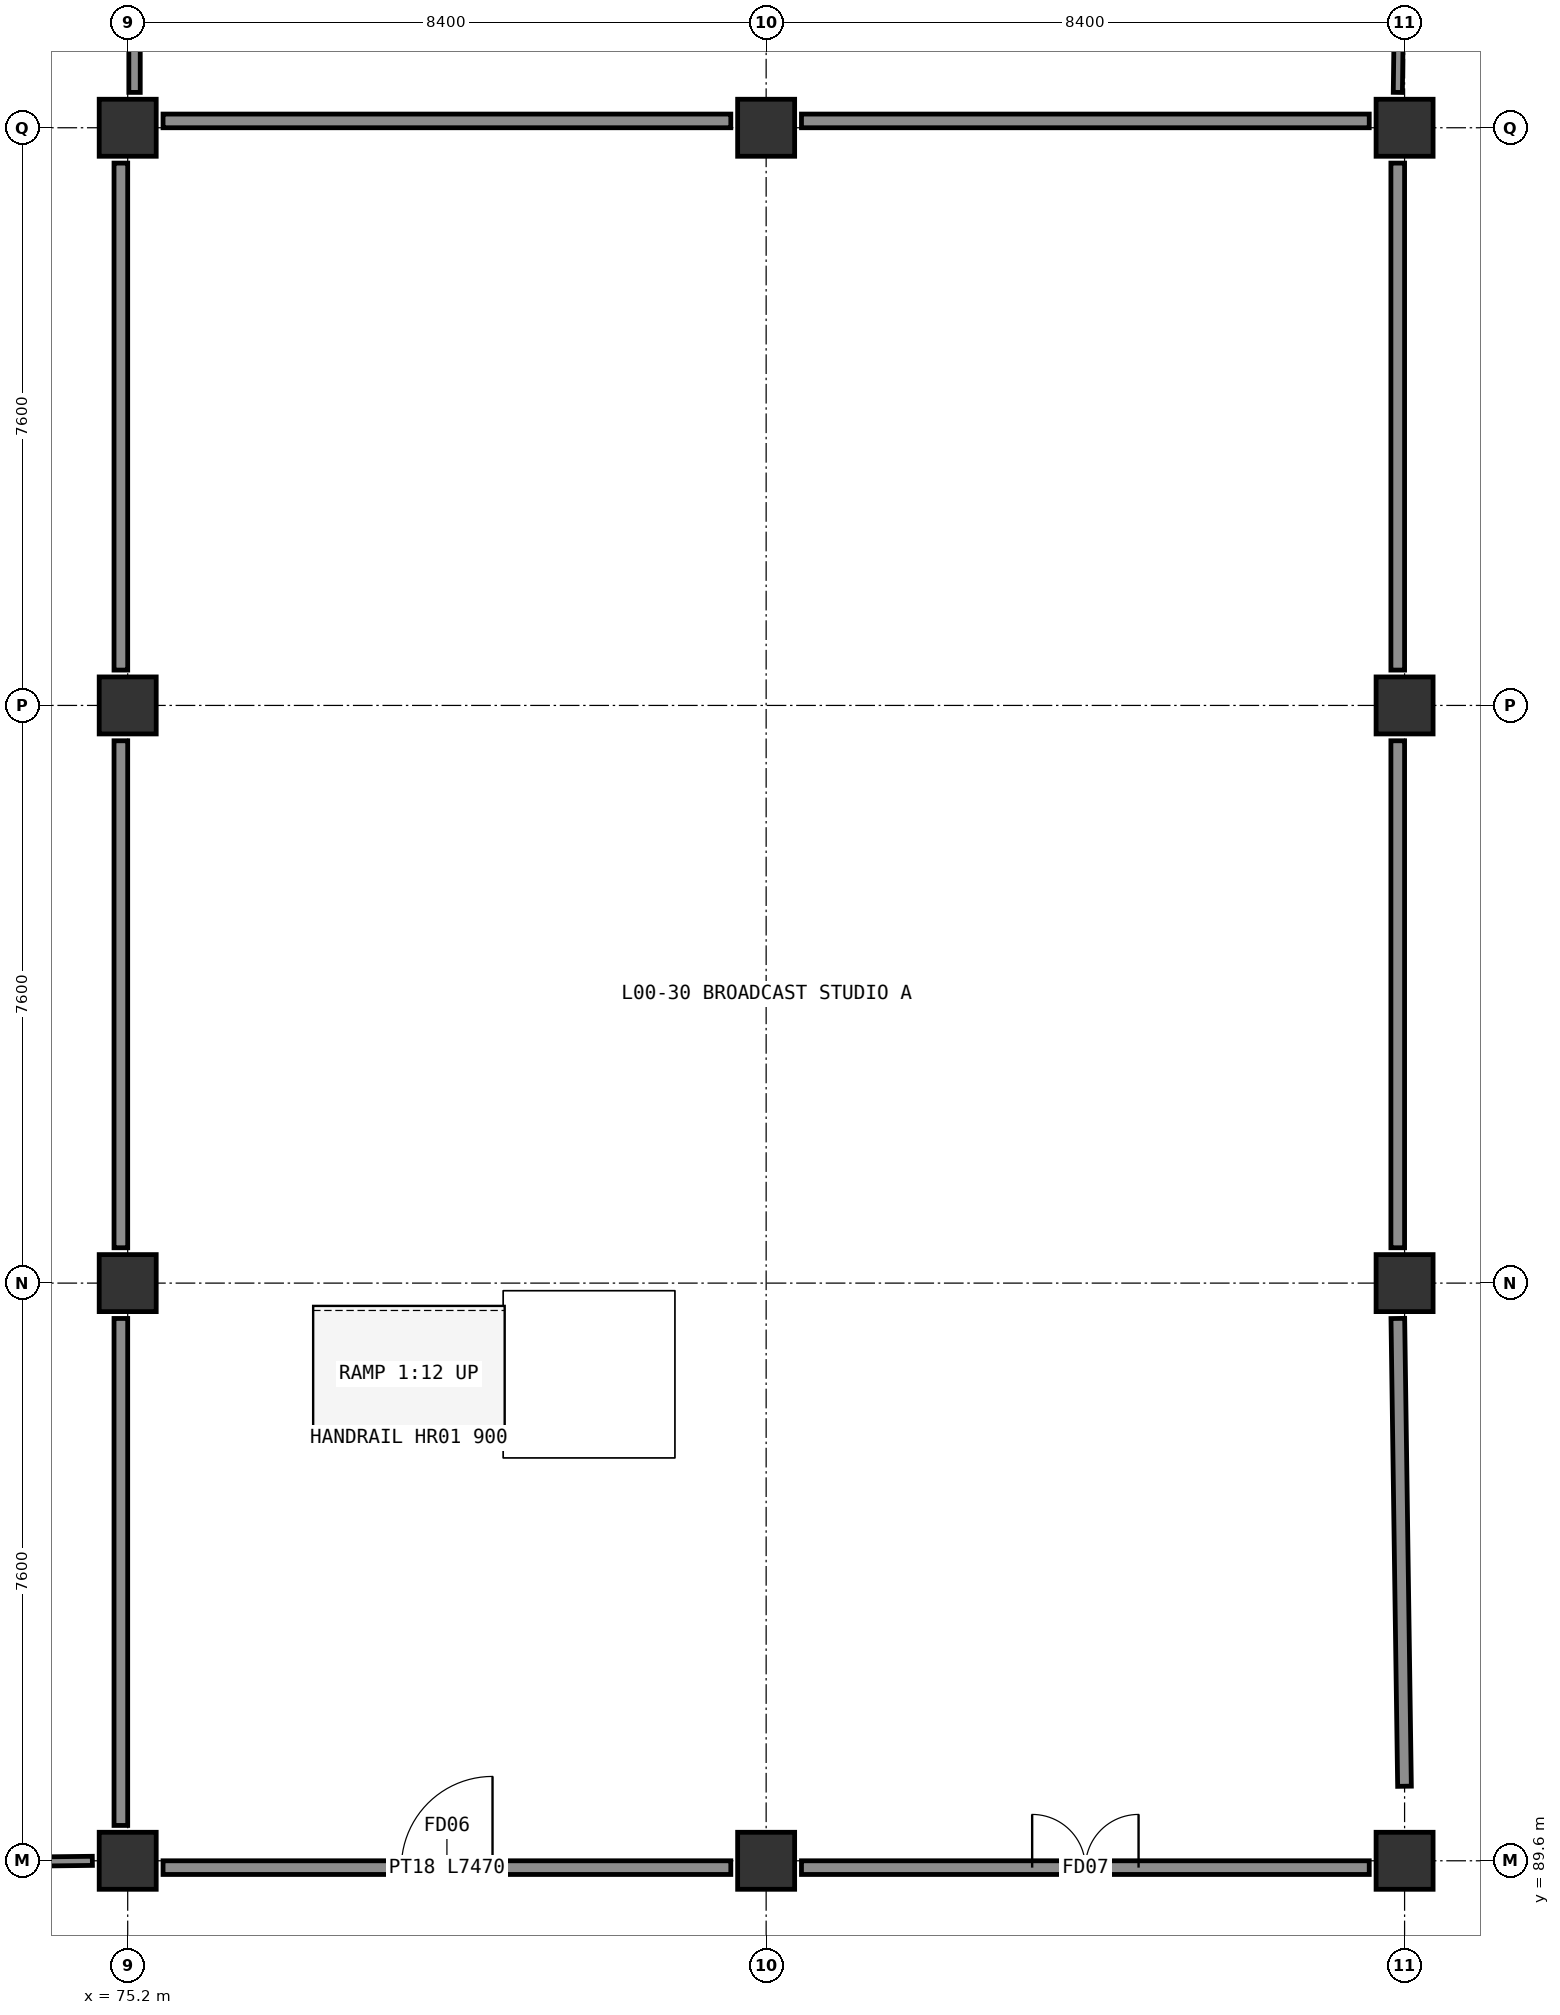
"""IFC4 building model, lengths in metres.
Left out: names, types, materials, properties, quantities, classifications, styles, units other than length and angle.
Written with IfcOpenShell. Run it as: python <this file> out.ifc"""

import sys

from ifc_helpers import new_model, si_unit, direction, frame, frame_2d, origin, origin_2d, place, context, subcontext, project, spatial, rectangle, extrude, element, fill, save


model = new_model("IFC4")
c1 = context("Model", 3, precision=1e-05, world=origin(), true_north=direction((0.0, 1.0)))
c2 = subcontext(c1, "Body", "Model", "MODEL_VIEW")
j1 = project(units=[si_unit("LENGTHUNIT", "METRE"), si_unit("PLANEANGLEUNIT", "RADIAN")], contexts=[c1])
p1 = place(None, origin())
s1 = spatial("IfcSite", under=j1, at=p1, CompositionType="ELEMENT")
p2 = place(p1, origin())
s2 = spatial("IfcBuilding", under=s1, at=p2, CompositionType="ELEMENT")
p3 = place(p2, origin())
s3 = spatial("IfcBuildingStorey", under=s2, at=p3, CompositionType="ELEMENT", Elevation=0.0)
for number, where, z_axis, x_axis in (
    (1, (75.2, 89.6, 0.0), (0.0, 0.0, 1.0), (1.0, 0.0, 0.0)),
    (2, (83.6, 89.6, 0.0), (0.0, 0.0, 1.0), (1.0, 0.0, 0.0)),
    (3, (92.0, 89.6, 0.0), (0.0, 0.0, 1.0), (1.0, 0.0, 0.0)),
    (4, (75.2, 97.2, 0.0), (0.0, 0.0, 1.0), (1.0, 0.0, 0.0)),
    (5, (92.0, 97.2, 0.0), (0.0, 0.0, 1.0), (1.0, 0.0, 0.0)),
    (6, (75.2, 104.8, 0.0), (0.0, 0.0, 1.0), (1.0, 0.0, 0.0)),
    (7, (92.0, 104.8, 0.0), (0.0, 0.0, 1.0), (1.0, 0.0, 0.0)),
    (8, (75.2, 112.4, 0.0), (0.0, 0.0, 1.0), (1.0, 0.0, 0.0)),
    (9, (83.6, 112.4, 0.0), (0.0, 0.0, 1.0), (1.0, 0.0, 0.0)),
    (10, (92.0, 112.4, 0.0), (0.0, 0.0, 1.0), (1.0, 0.0, 0.0)),
):
    element("IfcColumn", number, at=place(p3, frame(where, z_axis=z_axis, x_axis=x_axis)), inside=s3, PredefinedType="COLUMN", context=c2, shape_type="SweptSolid", body=[
        extrude(rectangle(XDim=0.75, YDim=0.75, at=origin_2d()), origin(), (0.0, 0.0, 1.0), 4.8),
    ])
p4 = place(p3, frame((67.28, 89.511, 0.0), z_axis=(0.0, 0.0, 1.0), x_axis=(0.999930126163, 0.01182128555, 0.0)))
e11 = element("IfcWall", 11, at=p4, inside=s3, PredefinedType="PARTITIONING", context=c2, shape_type="SweptSolid", body=[
    extrude(rectangle(XDim=7.456, YDim=0.12, at=frame_2d((3.728, 0.0))), origin(), (0.0, 0.0, 1.0), 3.95),
])
p5 = place(p4, frame((3.103, 0.0, 0.0)))
e12 = element("IfcOpeningElement", 12, at=p5, cuts=e11, PredefinedType="OPENING", context=c2, shape_type="SweptSolid", body=[
    extrude(rectangle(XDim=1.25, YDim=2.12, at=frame_2d((0.625, 1.06))), frame((0.0, 0.07, 0.0), z_axis=(0.0, -1.0, 0.0), x_axis=(1.0, 0.0, 0.0)), (0.0, 0.0, 1.0), 0.14),
])
p6 = place(p3, frame((75.665, 89.51, 0.0), z_axis=(0.0, 0.0, 1.0), x_axis=(1.0, 0.0, 0.0)))
e13 = element("IfcWall", 13, at=p6, inside=s3, PredefinedType="PARTITIONING", context=c2, shape_type="SweptSolid", body=[
    extrude(rectangle(XDim=7.47, YDim=0.18, at=frame_2d((3.735, 0.0))), origin(), (0.0, 0.0, 1.0), 4.187),
])
p7 = place(p6, frame((3.135, 0.0, 0.0)))
e14 = element("IfcOpeningElement", 14, at=p7, cuts=e13, PredefinedType="OPENING", context=c2, shape_type="SweptSolid", body=[
    extrude(rectangle(XDim=1.2, YDim=2.1, at=frame_2d((0.6, 1.05))), frame((0.0, 0.1, 0.0), z_axis=(0.0, -1.0, 0.0), x_axis=(1.0, 0.0, 0.0)), (0.0, 0.0, 1.0), 0.2),
])
p8 = place(p3, frame((84.065, 89.51, 0.0), z_axis=(0.0, 0.0, 1.0), x_axis=(1.0, 0.0, 0.0)))
e15 = element("IfcWall", 15, at=p8, inside=s3, PredefinedType="PARTITIONING", context=c2, shape_type="SweptSolid", body=[
    extrude(rectangle(XDim=7.47, YDim=0.18, at=frame_2d((3.735, 0.0))), origin(), (0.0, 0.0, 1.0), 4.187),
])
p9 = place(p8, frame((3.035, 0.0, 0.0)))
e16 = element("IfcOpeningElement", 16, at=p9, cuts=e15, PredefinedType="OPENING", context=c2, shape_type="SweptSolid", body=[
    extrude(rectangle(XDim=1.4, YDim=2.15, at=frame_2d((0.7, 1.075))), frame((0.0, 0.1, 0.0), z_axis=(0.0, -1.0, 0.0), x_axis=(1.0, 0.0, 0.0)), (0.0, 0.0, 1.0), 0.2),
])
p10 = place(p3, frame((75.29, 112.865, 0.0), z_axis=(0.0, 0.0, 1.0), x_axis=(0.0, 1.0, 0.0)))
e17 = element("IfcWall", 17, at=p10, inside=s3, PredefinedType="PARTITIONING", context=c2, shape_type="SweptSolid", body=[
    extrude(rectangle(XDim=6.655, YDim=0.15, at=frame_2d((3.328, 0.0))), origin(), (0.0, 0.0, 1.0), 3.95),
])
p11 = place(p10, frame((2.887, 0.0, 0.0)))
e18 = element("IfcOpeningElement", 18, at=p11, cuts=e17, PredefinedType="OPENING", context=c2, shape_type="SweptSolid", body=[
    extrude(rectangle(XDim=0.88, YDim=2.08, at=frame_2d((0.44, 1.04))), frame((0.0, 0.085, 0.0), z_axis=(0.0, -1.0, 0.0), x_axis=(1.0, 0.0, 0.0)), (0.0, 0.0, 1.0), 0.17),
])
for number, where, z_axis, x_axis in (
    (19, (83.135, 112.49, 0.0), (0.0, 0.0, 1.0), (-1.0, 0.0, 0.0)),
    (20, (91.535, 112.49, 0.0), (0.0, 0.0, 1.0), (-1.0, 0.0, 0.0)),
):
    element("IfcWall", number, at=place(p3, frame(where, z_axis=z_axis, x_axis=x_axis)), inside=s3, PredefinedType="PARTITIONING", context=c2, shape_type="SweptSolid", body=[
        extrude(rectangle(XDim=7.47, YDim=0.18, at=frame_2d((3.735, 0.0))), origin(), (0.0, 0.0, 1.0), 4.187),
    ])
p12 = place(p3, frame((91.999, 119.52, 0.0), z_axis=(0.0, 0.0, 1.0), x_axis=(-0.013168820212, -0.999913287328, 0.0)))
e21 = element("IfcWall", 21, at=p12, inside=s3, PredefinedType="PARTITIONING", context=c2, shape_type="SweptSolid", body=[
    extrude(rectangle(XDim=6.656, YDim=0.12, at=frame_2d((3.328, 0.0))), origin(), (0.0, 0.0, 1.0), 3.95),
])
p13 = place(p12, frame((2.868, 0.0, 0.0)))
e22 = element("IfcOpeningElement", 22, at=p13, cuts=e21, PredefinedType="OPENING", context=c2, shape_type="SweptSolid", body=[
    extrude(rectangle(XDim=0.92, YDim=2.08, at=frame_2d((0.46, 1.04))), frame((0.0, 0.07, 0.0), z_axis=(0.0, -1.0, 0.0), x_axis=(1.0, 0.0, 0.0)), (0.0, 0.0, 1.0), 0.14),
])
p14 = place(p3, frame((75.11, 104.335, 0.0), z_axis=(0.0, 0.0, 1.0), x_axis=(0.0, -1.0, 0.0)))
e23 = element("IfcWall", 23, at=p14, inside=s3, PredefinedType="PARTITIONING", context=c2, shape_type="SweptSolid", body=[
    extrude(rectangle(XDim=6.67, YDim=0.18, at=frame_2d((3.335, 0.0))), origin(), (0.0, 0.0, 1.0), 3.95),
])
for number, where, z_axis, x_axis in (
    (24, (75.11, 111.935, 0.0), (0.0, 0.0, 1.0), (0.0, -1.0, 0.0)),
    (25, (75.11, 96.735, 0.0), (0.0, 0.0, 1.0), (0.0, -1.0, 0.0)),
):
    element("IfcWall", number, at=place(p3, frame(where, z_axis=z_axis, x_axis=x_axis)), inside=s3, PredefinedType="PARTITIONING", context=c2, shape_type="SweptSolid", body=[
        extrude(rectangle(XDim=6.67, YDim=0.18, at=frame_2d((3.335, 0.0))), origin(), (0.0, 0.0, 1.0), 3.95),
    ])
p15 = place(p3, frame((91.91, 104.335, 0.0), z_axis=(0.0, 0.0, 1.0), x_axis=(0.0, -1.0, 0.0)))
e26 = element("IfcWall", 26, at=p15, inside=s3, PredefinedType="PARTITIONING", context=c2, shape_type="SweptSolid", body=[
    extrude(rectangle(XDim=6.67, YDim=0.18, at=frame_2d((3.335, 0.0))), origin(), (0.0, 0.0, 1.0), 3.95),
])
p16 = place(p3, frame((91.91, 111.935, 0.0), z_axis=(0.0, 0.0, 1.0), x_axis=(0.0, -1.0, 0.0)))
e27 = element("IfcWall", 27, at=p16, inside=s3, PredefinedType="PARTITIONING", context=c2, shape_type="SweptSolid", body=[
    extrude(rectangle(XDim=6.67, YDim=0.18, at=frame_2d((3.335, 0.0))), origin(), (0.0, 0.0, 1.0), 3.95),
])
p17 = place(p3, frame((91.911, 96.735, 0.0), z_axis=(0.0, 0.0, 1.0), x_axis=(0.014239501849, -0.999898613154, 0.0)))
e28 = element("IfcWall", 28, at=p17, inside=s3, PredefinedType="PARTITIONING", context=c2, shape_type="SweptSolid", body=[
    extrude(rectangle(XDim=6.155, YDim=0.18, at=frame_2d((3.078, 0.0))), origin(), (0.0, 0.0, 1.0), 3.95),
])
p18 = place(p7, origin())
e29 = element("IfcDoor", 29, at=p18, inside=s3, OperationType="SINGLE_SWING_RIGHT", PredefinedType="DOOR", context=c2, shape_type="SweptSolid", body=[
    extrude(rectangle(XDim=1.2, YDim=2.1, at=frame_2d((0.6, 1.05))), frame((0.0, 0.025, 0.0), z_axis=(0.0, -1.0, 0.0), x_axis=(1.0, 0.0, 0.0)), (0.0, 0.0, 1.0), 0.05),
])
fill(e14, e29)
p19 = place(p9, origin())
e30 = element("IfcDoor", 30, at=p19, inside=s3, OperationType="DOUBLE_DOOR_SINGLE_SWING", PredefinedType="DOOR", context=c2, shape_type="SweptSolid", body=[
    extrude(rectangle(XDim=1.4, YDim=2.15, at=frame_2d((0.7, 1.075))), frame((0.0, 0.025, 0.0), z_axis=(0.0, -1.0, 0.0), x_axis=(1.0, 0.0, 0.0)), (0.0, 0.0, 1.0), 0.05),
])
fill(e16, e30)
save(model, sys.argv[1])
